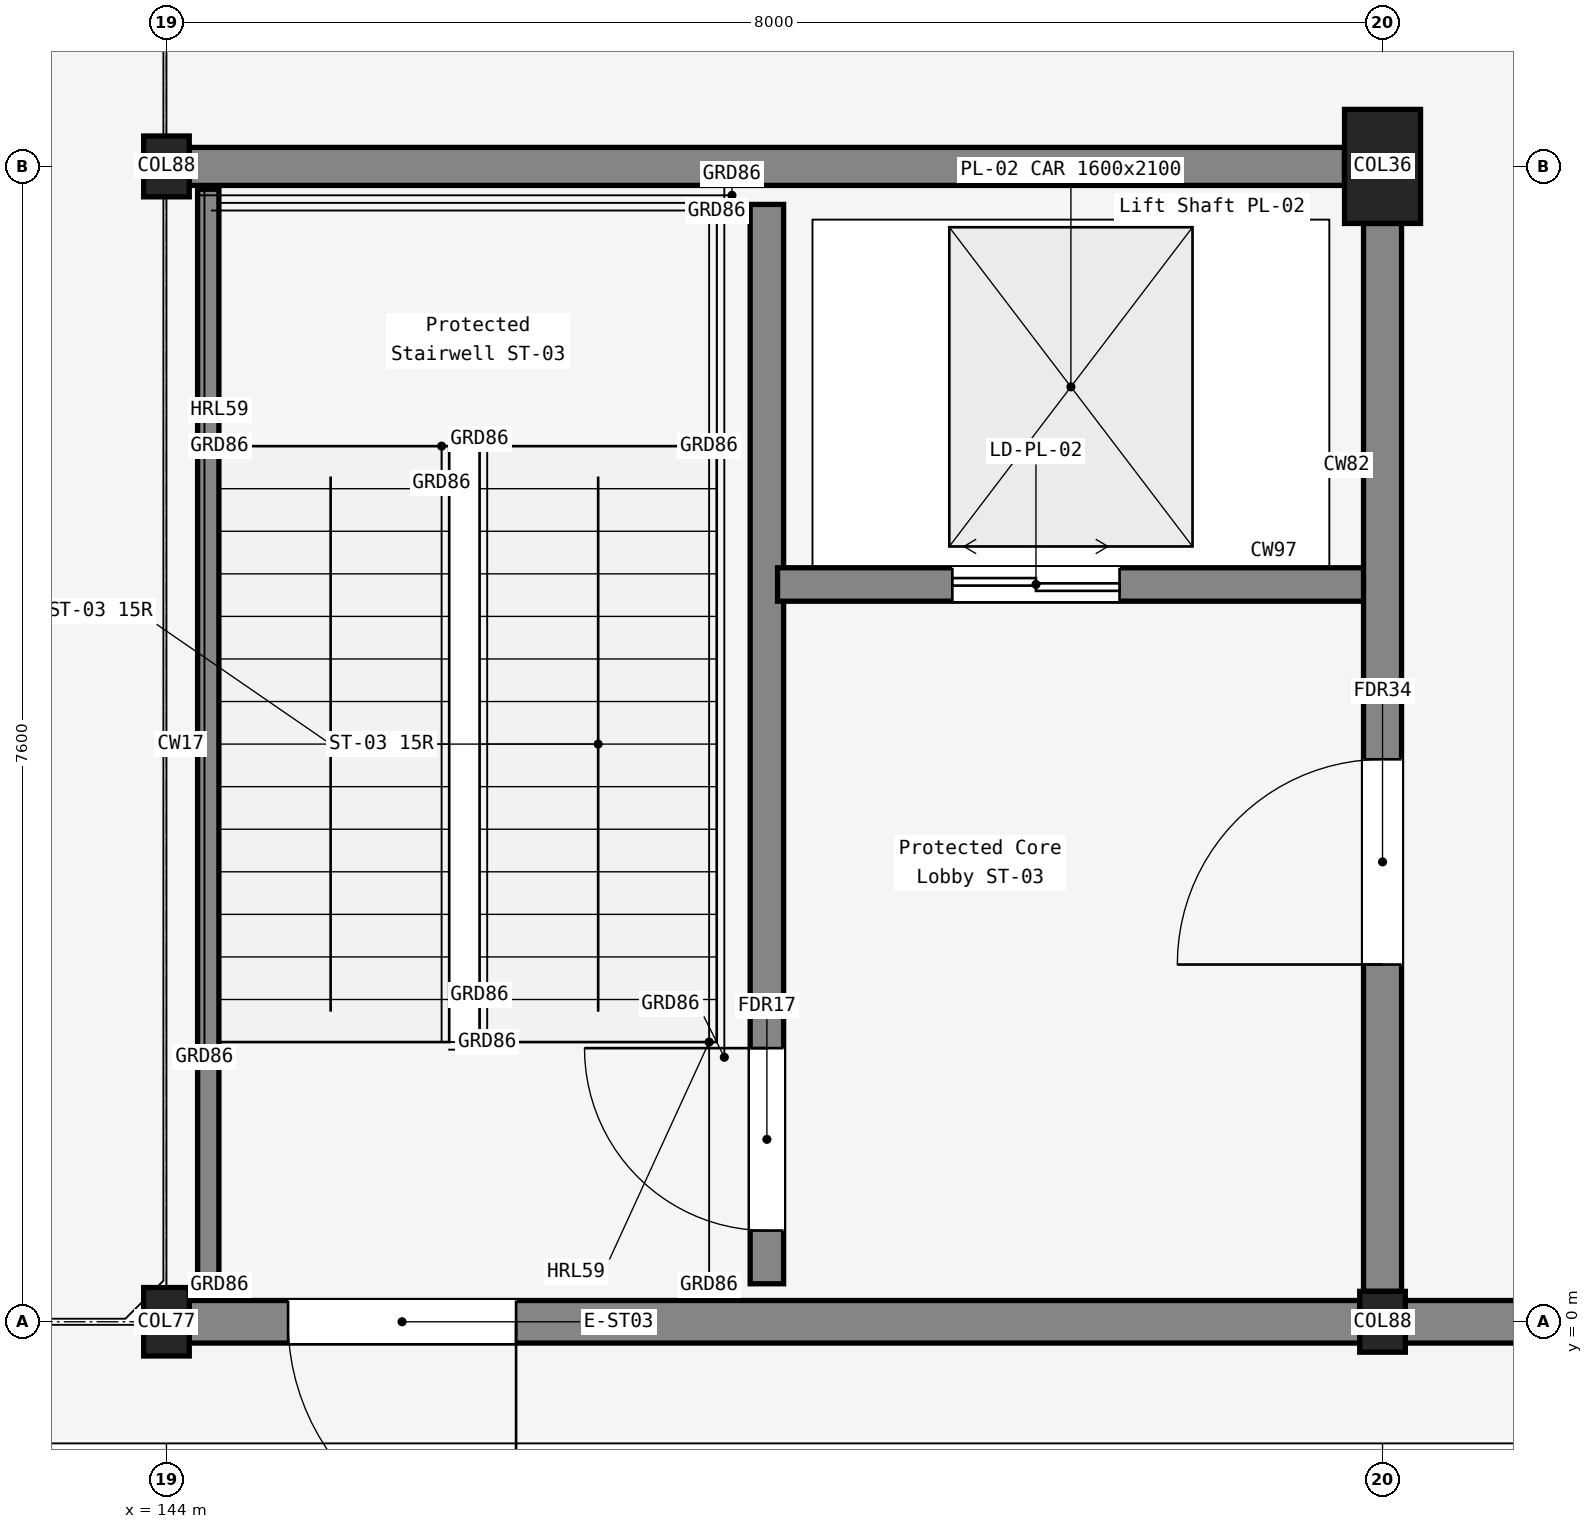
"""IFC4 building model, lengths in metres.
Left out: names, types, materials, properties, quantities, classifications, styles, units other than length and angle.
Written with IfcOpenShell. Run it as: python <this file> out.ifc"""

import sys

from ifc_helpers import new_model, si_unit, direction, frame, frame_2d, origin, origin_2d, place, context, subcontext, project, spatial, rectangle, extrude, element, fill, save


model = new_model("IFC4")
c1 = context("Model", 3, precision=1e-05, world=origin(), true_north=direction((0.0, 1.0)))
c2 = subcontext(c1, "Body", "Model", "MODEL_VIEW")
j1 = project(units=[si_unit("LENGTHUNIT", "METRE"), si_unit("PLANEANGLEUNIT", "RADIAN")], contexts=[c1])
p1 = place(None, origin())
s1 = spatial("IfcSite", under=j1, at=p1, CompositionType="ELEMENT")
p2 = place(p1, origin())
s2 = spatial("IfcBuilding", under=s1, at=p2, CompositionType="ELEMENT")
p3 = place(p2, frame((0.0, 0.0, -5.4)))
s3 = spatial("IfcBuildingStorey", under=s2, at=p3, CompositionType="ELEMENT", Elevation=-5.4)
for number, where, z_axis, x_axis in (
    (1, (144.0, 0.0, 0.0), (0.0, 0.0, 1.0), (1.0, 0.0, 0.0)),
    (2, (152.0, 0.0, 0.0), (0.0, 0.0, 1.0), (1.0, 0.0, 0.0)),
):
    element("IfcWall", number, at=place(p3, frame(where, z_axis=z_axis, x_axis=x_axis)), inside=s3, PredefinedType="USERDEFINED", context=c2, shape_type="SweptSolid", body=[
        extrude(rectangle(XDim=8.0, YDim=0.4, at=frame_2d((4.0, 0.0))), origin(), (0.0, 0.0, 1.0), 5.08),
    ])
p4 = place(p3, frame((144.0, 7.6, 0.0), z_axis=(0.0, 0.0, 1.0), x_axis=(0.0, -1.0, 0.0)))
e3 = element("IfcWall", 3, at=p4, inside=s3, PredefinedType="USERDEFINED", context=c2, shape_type="SweptSolid", body=[
    extrude(rectangle(XDim=7.6, YDim=0.4, at=frame_2d((3.8, 0.0))), origin(), (0.0, 0.0, 1.0), 5.08),
])
p5 = place(p3, frame((144.0, 15.2, 0.0), z_axis=(0.0, 0.0, 1.0), x_axis=(0.0, -1.0, 0.0)))
e4 = element("IfcWall", 4, at=p5, inside=s3, PredefinedType="USERDEFINED", context=c2, shape_type="SweptSolid", body=[
    extrude(rectangle(XDim=7.6, YDim=0.4, at=frame_2d((3.8, 0.0))), origin(), (0.0, 0.0, 1.0), 5.08),
])
p6 = place(p3, frame((144.0, 0.2, -0.5), z_axis=(0.0, 0.0, 1.0), x_axis=(-1.0, 0.0, 0.0)))
e5 = element("IfcWall", 5, at=p6, inside=s3, PredefinedType="USERDEFINED", context=c2, shape_type="SweptSolid", body=[
    extrude(rectangle(XDim=8.0, YDim=0.4, at=frame_2d((4.0, 0.0))), origin(), (0.0, 0.0, 1.0), 5.6),
])
p7 = place(p3, frame((144.0, 0.0, 0.0), z_axis=(0.0, 0.0, 1.0), x_axis=(1.0, 0.0, 0.0)))
e6 = element("IfcColumn", 6, at=p7, inside=s3, PredefinedType="COLUMN", context=c2, shape_type="SweptSolid", body=[
    extrude(rectangle(XDim=0.8, YDim=0.8, at=origin_2d()), origin(), (0.0, 0.0, 1.0), 5.4),
])
for number, where, z_axis, x_axis in (
    (7, (144.0, 7.6, 0.0), (0.0, 0.0, 1.0), (1.0, 0.0, 0.0)),
    (8, (152.0, 0.0, 0.0), (0.0, 0.0, 1.0), (1.0, 0.0, 0.0)),
):
    element("IfcColumn", number, at=place(p3, frame(where, z_axis=z_axis, x_axis=x_axis)), inside=s3, PredefinedType="COLUMN", context=c2, shape_type="SweptSolid", body=[
        extrude(rectangle(XDim=0.7, YDim=0.7, at=origin_2d()), origin(), (0.0, 0.0, 1.0), 5.4),
    ])
p8 = place(p3, frame((152.0, 7.6, 0.0), z_axis=(0.0, 0.0, 1.0), x_axis=(1.0, 0.0, 0.0)))
e9 = element("IfcColumn", 9, at=p8, inside=s3, PredefinedType="COLUMN", context=c2, shape_type="SweptSolid", body=[
    extrude(rectangle(XDim=0.6, YDim=0.9, at=origin_2d()), origin(), (0.0, 0.0, 1.0), 5.4),
])
p9 = place(p3, frame((144.35, 7.6, 0.0), z_axis=(0.0, 0.0, 1.0), x_axis=(1.0, 0.0, 0.0)))
e10 = element("IfcWall", 10, at=p9, inside=s3, PredefinedType="SOLIDWALL", context=c2, shape_type="SweptSolid", body=[
    extrude(rectangle(XDim=7.35, YDim=0.25, at=frame_2d((3.675, 0.0))), origin(), (0.0, 0.0, 1.0), 4.33),
])
p10 = place(p3, frame((147.95, 0.25, 0.0), z_axis=(0.0, 0.0, 1.0), x_axis=(0.0, 1.0, 0.0)))
e11 = element("IfcWall", 11, at=p10, inside=s3, PredefinedType="SOLIDWALL", context=c2, shape_type="SweptSolid", body=[
    extrude(rectangle(XDim=7.1, YDim=0.22, at=frame_2d((3.55, 0.0))), origin(), (0.0, 0.0, 1.0), 5.08),
])
p11 = place(p10, frame((0.35, 0.0, 0.0)))
e12 = element("IfcOpeningElement", 12, at=p11, cuts=e11, PredefinedType="OPENING", context=c2, shape_type="SweptSolid", body=[
    extrude(rectangle(XDim=1.2, YDim=2.15, at=frame_2d((0.6, 1.075))), frame((0.0, 0.12, 0.0), z_axis=(0.0, -1.0, 0.0), x_axis=(1.0, 0.0, 0.0)), (0.0, 0.0, 1.0), 0.24),
])
p12 = place(p3, frame((148.02, 4.85, 0.0), z_axis=(0.0, 0.0, 1.0), x_axis=(1.0, 0.0, 0.0)))
e13 = element("IfcWall", 13, at=p12, inside=s3, PredefinedType="SOLIDWALL", context=c2, shape_type="SweptSolid", body=[
    extrude(rectangle(XDim=3.93, YDim=0.22, at=frame_2d((1.965, 0.0))), origin(), (0.0, 0.0, 1.0), 4.455),
])
p13 = place(p12, frame((1.15, 0.0, 0.0)))
e14 = element("IfcOpeningElement", 14, at=p13, cuts=e13, PredefinedType="OPENING", context=c2, shape_type="SweptSolid", body=[
    extrude(rectangle(XDim=1.1, YDim=2.2, at=frame_2d((0.55, 1.1))), frame((0.0, 0.12, 0.0), z_axis=(0.0, -1.0, 0.0), x_axis=(1.0, 0.0, 0.0)), (0.0, 0.0, 1.0), 0.24),
])
p14 = place(p3, frame((152.0, 0.35, 0.0), z_axis=(0.0, 0.0, 1.0), x_axis=(0.0, 1.0, 0.0)))
e15 = element("IfcWall", 15, at=p14, inside=s3, PredefinedType="SOLIDWALL", context=c2, shape_type="SweptSolid", body=[
    extrude(rectangle(XDim=6.8, YDim=0.25, at=frame_2d((3.4, 0.0))), origin(), (0.0, 0.0, 1.0), 4.45),
])
p15 = place(p14, frame((2.0, 0.0, 0.0)))
e16 = element("IfcOpeningElement", 16, at=p15, cuts=e15, PredefinedType="OPENING", context=c2, shape_type="SweptSolid", body=[
    extrude(rectangle(XDim=1.35, YDim=2.2, at=frame_2d((0.675, 1.1))), frame((0.0, 0.135, 0.0), z_axis=(0.0, -1.0, 0.0), x_axis=(1.0, 0.0, 0.0)), (0.0, 0.0, 1.0), 0.27),
])
p16 = place(p3, frame((144.275, 0.15, 0.0), z_axis=(0.0, 0.0, 1.0), x_axis=(0.0, 1.0, 0.0)))
e17 = element("IfcWall", 17, at=p16, inside=s3, PredefinedType="SOLIDWALL", context=c2, shape_type="SweptSolid", body=[
    extrude(rectangle(XDim=7.3, YDim=0.14, at=frame_2d((3.65, 0.0))), origin(), (0.0, 0.0, 1.0), 5.08),
])
p17 = place(p11, origin())
e18 = element("IfcDoor", 18, at=p17, inside=s3, OperationType="SINGLE_SWING_RIGHT", PredefinedType="DOOR", context=c2, shape_type="SweptSolid", body=[
    extrude(rectangle(XDim=1.2, YDim=2.15, at=frame_2d((0.6, 1.075))), frame((0.0, 0.025, 0.0), z_axis=(0.0, -1.0, 0.0), x_axis=(1.0, 0.0, 0.0)), (0.0, 0.0, 1.0), 0.05),
])
fill(e12, e18)
p18 = place(p13, origin())
e19 = element("IfcDoor", 19, at=p18, inside=s3, OperationType="DOUBLE_DOOR_SLIDING", PredefinedType="DOOR", context=c2, shape_type="SweptSolid", body=[
    extrude(rectangle(XDim=1.1, YDim=2.2, at=frame_2d((0.55, 1.1))), frame((0.0, 0.025, 0.0), z_axis=(0.0, -1.0, 0.0), x_axis=(1.0, 0.0, 0.0)), (0.0, 0.0, 1.0), 0.05),
])
fill(e14, e19)
p19 = place(p15, origin())
e20 = element("IfcDoor", 20, at=p19, inside=s3, OperationType="SINGLE_SWING_LEFT", PredefinedType="DOOR", context=c2, shape_type="SweptSolid", body=[
    extrude(rectangle(XDim=1.35, YDim=2.2, at=frame_2d((0.675, 1.1))), frame((0.0, 0.025, 0.0), z_axis=(0.0, -1.0, 0.0), x_axis=(1.0, 0.0, 0.0)), (0.0, 0.0, 1.0), 0.05),
])
fill(e16, e20)
save(model, sys.argv[1])
